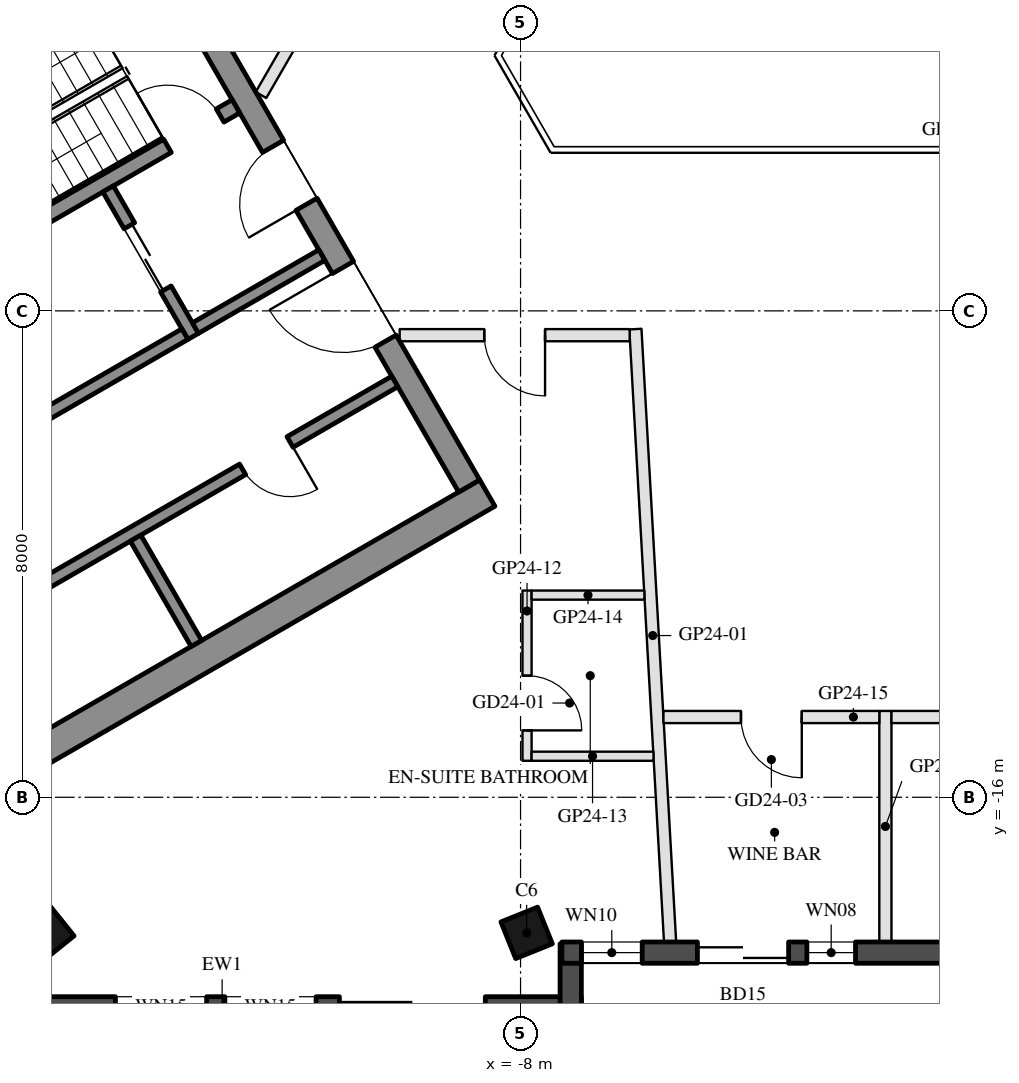
"""IFC4 building model, lengths in metres.
Left out: names, types, materials, properties, quantities, classifications, styles, units other than length and angle.
Written with IfcOpenShell. Run it as: python <this file> out.ifc"""

import sys

from ifc_helpers import new_model, si_unit, direction, frame, frame_2d, origin, origin_2d, place, context, subcontext, project, spatial, rectangle, hollow_rectangle, extrude, boolean, halfspace, element, fill, save


model = new_model("IFC4")
c1 = context("Model", 3, precision=1e-05, world=origin(), true_north=direction((0.0, 1.0)))
c2 = subcontext(c1, "Body", "Model", "MODEL_VIEW")
j1 = project(units=[si_unit("LENGTHUNIT", "METRE"), si_unit("PLANEANGLEUNIT", "RADIAN")], contexts=[c1])
p1 = place(None, origin())
s1 = spatial("IfcSite", under=j1, at=p1, CompositionType="ELEMENT")
p2 = place(p1, origin())
s2 = spatial("IfcBuilding", under=s1, at=p2, CompositionType="ELEMENT")
p3 = place(p2, frame((0.0, 0.0, 254.1)))
s3 = spatial("IfcBuildingStorey", under=s2, at=p3, CompositionType="ELEMENT", Elevation=254.1)
p4 = place(p3, frame((-15.8, -18.23, 0.0), z_axis=(0.121069901949, 0.150398600122, 0.981184151892), x_axis=(-0.992602524484, 0.009308864005, 0.121051945213)))
e1 = element("IfcColumn", 1, at=p4, inside=s3, PredefinedType="COLUMN", context=c2, shape_type="SweptSolid", body=[
    boolean("DIFFERENCE", boolean("DIFFERENCE", extrude(hollow_rectangle(XDim=0.65, YDim=0.65, WallThickness=0.03, at=origin_2d()), origin(), (0.0, 0.0, 1.0), 3.771), halfspace(frame((0.0, 0.0, 0.047), z_axis=(0.0, 0.0, 1.0), x_axis=(1.0, 0.0, 0.0)), True)), halfspace(frame((0.0, 0.0, 3.724), z_axis=(0.0, 0.0, 1.0), x_axis=(1.0, 0.0, 0.0)), False)),
])
p5 = place(p3, frame((-7.9, -18.23, 0.0), z_axis=(0.060805602285, 0.151232777417, 0.986626234075), x_axis=(-0.998137511125, 0.004342411053, 0.060849423591)))
e2 = element("IfcColumn", 2, at=p5, inside=s3, PredefinedType="COLUMN", context=c2, shape_type="SweptSolid", body=[
    boolean("DIFFERENCE", boolean("DIFFERENCE", extrude(hollow_rectangle(XDim=0.65, YDim=0.65, WallThickness=0.03, at=origin_2d()), origin(), (0.0, 0.0, 1.0), 3.75), halfspace(frame((0.0, 0.0, 0.04), z_axis=(0.0, 0.0, 1.0), x_axis=(1.0, 0.0, 0.0)), True)), halfspace(frame((0.0, 0.0, 3.71), z_axis=(0.0, 0.0, 1.0), x_axis=(1.0, 0.0, 0.0)), False)),
])
p6 = place(p3, frame((-18.816, -19.455, 0.0), z_axis=(0.0, 0.0, 1.0), x_axis=(1.0, 0.0, 0.0)))
e3 = element("IfcWall", 3, at=p6, inside=s3, PredefinedType="SOLIDWALL", context=c2, shape_type="SweptSolid", body=[
    extrude(rectangle(XDim=11.816, YDim=0.35, at=frame_2d((5.908, 0.0))), origin(), (0.0, 0.0, 1.0), 3.55),
])
p7 = place(p6, frame((0.381, 0.0, 0.3)))
e4 = element("IfcOpeningElement", 4, at=p7, cuts=e3, PredefinedType="OPENING", context=c2, shape_type="SweptSolid", body=[
    extrude(rectangle(XDim=1.9, YDim=2.65, at=frame_2d((0.95, 1.325))), frame((0.0, 0.185, 0.0), z_axis=(0.0, -1.0, 0.0), x_axis=(1.0, 0.0, 0.0)), (0.0, 0.0, 1.0), 0.37),
])
p8 = place(p6, frame((7.836, 0.0, 0.0)))
e5 = element("IfcOpeningElement", 5, at=p8, cuts=e3, PredefinedType="OPENING", context=c2, shape_type="SweptSolid", body=[
    extrude(rectangle(XDim=2.4, YDim=2.4, at=frame_2d((1.2, 1.2))), frame((0.0, 0.185, 0.0), z_axis=(0.0, -1.0, 0.0), x_axis=(1.0, 0.0, 0.0)), (0.0, 0.0, 1.0), 0.37),
])
p9 = place(p6, frame((4.153, 0.0, 0.3)))
e6 = element("IfcOpeningElement", 6, at=p9, cuts=e3, PredefinedType="OPENING", context=c2, shape_type="SweptSolid", body=[
    extrude(rectangle(XDim=1.5, YDim=2.65, at=frame_2d((0.75, 1.325))), frame((0.0, 0.185, 0.0), z_axis=(0.0, -1.0, 0.0), x_axis=(1.0, 0.0, 0.0)), (0.0, 0.0, 1.0), 0.37),
])
p10 = place(p6, frame((5.953, 0.0, 0.3)))
e7 = element("IfcOpeningElement", 7, at=p10, cuts=e3, PredefinedType="OPENING", context=c2, shape_type="SweptSolid", body=[
    extrude(rectangle(XDim=1.5, YDim=2.65, at=frame_2d((0.75, 1.325))), frame((0.0, 0.185, 0.0), z_axis=(0.0, -1.0, 0.0), x_axis=(1.0, 0.0, 0.0)), (0.0, 0.0, 1.0), 0.37),
])
p11 = place(p3, frame((-7.175, -19.63, 0.0), z_axis=(0.0, 0.0, 1.0), x_axis=(0.0, 1.0, 0.0)))
e8 = element("IfcWall", 8, at=p11, inside=s3, PredefinedType="SOLIDWALL", context=c2, shape_type="SweptSolid", body=[
    extrude(rectangle(XDim=1.22, YDim=0.35, at=frame_2d((0.61, 0.0))), origin(), (0.0, 0.0, 1.0), 3.55),
])
p12 = place(p3, frame((-7.32, -18.555, 0.0), z_axis=(0.0, 0.0, 1.0), x_axis=(1.0, 0.0, 0.0)))
e9 = element("IfcWall", 9, at=p12, inside=s3, PredefinedType="SOLIDWALL", context=c2, shape_type="SweptSolid", body=[
    extrude(rectangle(XDim=6.74, YDim=0.35, at=frame_2d((3.37, 0.0))), origin(), (0.0, 0.0, 1.0), 3.55),
])
p13 = place(p12, frame((0.32, 0.0, 0.3)))
e10 = element("IfcOpeningElement", 10, at=p13, cuts=e9, PredefinedType="OPENING", context=c2, shape_type="SweptSolid", body=[
    extrude(rectangle(XDim=1.0, YDim=2.65, at=frame_2d((0.5, 1.325))), frame((0.0, 0.185, 0.0), z_axis=(0.0, -1.0, 0.0), x_axis=(1.0, 0.0, 0.0)), (0.0, 0.0, 1.0), 0.37),
])
p14 = place(p12, frame((2.229, 0.0, 0.0)))
e11 = element("IfcOpeningElement", 11, at=p14, cuts=e9, PredefinedType="OPENING", context=c2, shape_type="SweptSolid", body=[
    extrude(rectangle(XDim=1.5, YDim=2.4, at=frame_2d((0.75, 1.2))), frame((0.0, 0.185, 0.0), z_axis=(0.0, -1.0, 0.0), x_axis=(1.0, 0.0, 0.0)), (0.0, 0.0, 1.0), 0.37),
])
p15 = place(p12, frame((4.029, 0.0, 0.3)))
e12 = element("IfcOpeningElement", 12, at=p15, cuts=e9, PredefinedType="OPENING", context=c2, shape_type="SweptSolid", body=[
    extrude(rectangle(XDim=0.8, YDim=2.65, at=frame_2d((0.4, 1.325))), frame((0.0, 0.185, 0.0), z_axis=(0.0, -1.0, 0.0), x_axis=(1.0, 0.0, 0.0)), (0.0, 0.0, 1.0), 0.37),
])
for number, where, z_axis, x_axis in (
    (13, (-13.797, -1.903, 0.0), (0.0, 0.0, 1.0), (-0.866, -0.5, 0.0)),
    (14, (-8.547, -10.997, 0.0), (0.0, 0.0, 1.0), (-0.866, -0.5, 0.0)),
):
    element("IfcWall", number, at=place(p3, frame(where, z_axis=z_axis, x_axis=x_axis)), inside=s3, PredefinedType="SHEAR", context=c2, shape_type="SweptSolid", body=[
        extrude(rectangle(XDim=14.837, YDim=0.5, at=frame_2d((7.418, 0.0))), origin(), (0.0, 0.0, 1.0), 3.5),
    ])
p16 = place(p3, frame((-13.845, -2.22, 0.0), z_axis=(0.0, 0.0, 1.0), x_axis=(0.500004234368, -0.866022959057, 0.0)))
e15 = element("IfcWall", 15, at=p16, inside=s3, PredefinedType="SHEAR", context=c2, shape_type="SweptSolid", body=[
    extrude(rectangle(XDim=10.0, YDim=0.4, at=frame_2d((5.0, 0.0))), origin(), (0.0, 0.0, 1.0), 3.5),
])
p17 = place(p16, frame((3.55, 0.0, 0.0)))
e16 = element("IfcOpeningElement", 16, at=p17, cuts=e15, PredefinedType="OPENING", context=c2, shape_type="SweptSolid", body=[
    extrude(rectangle(XDim=1.1, YDim=2.1, at=frame_2d((0.55, 1.05))), frame((0.0, 0.21, 0.0), z_axis=(0.0, -1.0, 0.0), x_axis=(1.0, 0.0, 0.0)), (0.0, 0.0, 1.0), 0.42),
])
p18 = place(p16, frame((5.85, 0.0, 0.0)))
e17 = element("IfcOpeningElement", 17, at=p18, cuts=e15, PredefinedType="OPENING", context=c2, shape_type="SweptSolid", body=[
    extrude(rectangle(XDim=1.4, YDim=2.1, at=frame_2d((0.7, 1.05))), frame((0.0, 0.21, 0.0), z_axis=(0.0, -1.0, 0.0), x_axis=(1.0, 0.0, 0.0)), (0.0, 0.0, 1.0), 0.42),
])
p19 = place(p3, frame((-12.681, -4.636, 0.0), z_axis=(0.0, 0.0, 1.0), x_axis=(-0.866021702275, -0.500006411147, 0.0)))
e18 = element("IfcWall", 18, at=p19, inside=s3, PredefinedType="SHEAR", context=c2, shape_type="SweptSolid", body=[
    extrude(rectangle(XDim=6.45, YDim=0.25, at=frame_2d((3.225, 0.0))), origin(), (0.0, 0.0, 1.0), 3.5),
])
p20 = place(p19, frame((0.3, 0.0, 0.0)))
e19 = element("IfcOpeningElement", 19, at=p20, cuts=e18, PredefinedType="OPENING", context=c2, shape_type="SweptSolid", body=[
    extrude(rectangle(XDim=1.0, YDim=2.1, at=frame_2d((0.5, 1.05))), frame((0.0, 0.135, 0.0), z_axis=(0.0, -1.0, 0.0), x_axis=(1.0, 0.0, 0.0)), (0.0, 0.0, 1.0), 0.27),
])
p21 = place(p3, frame((-14.783, -5.995, 0.0), z_axis=(0.0, 0.0, 1.0), x_axis=(0.49994636267, -0.866056369097, 0.0)))
e20 = element("IfcWall", 20, at=p21, inside=s3, PredefinedType="SHEAR", context=c2, shape_type="SweptSolid", body=[
    extrude(rectangle(XDim=2.8, YDim=0.2, at=frame_2d((1.4, 0.0))), origin(), (0.0, 0.0, 1.0), 3.5),
])
p22 = place(p21, frame((0.7, 0.0, 0.0)))
e21 = element("IfcOpeningElement", 21, at=p22, cuts=e20, PredefinedType="OPENING", context=c2, shape_type="SweptSolid", body=[
    extrude(rectangle(XDim=1.2, YDim=2.1, at=frame_2d((0.6, 1.05))), frame((0.0, 0.11, 0.0), z_axis=(0.0, -1.0, 0.0), x_axis=(1.0, 0.0, 0.0)), (0.0, 0.0, 1.0), 0.22),
])
p23 = place(p3, frame((-13.52, -8.383, 0.0), z_axis=(0.0, 0.0, 1.0), x_axis=(-0.866034573852, -0.49998411664, 0.0)))
e22 = element("IfcWall", 22, at=p23, inside=s3, PredefinedType="SHEAR", context=c2, shape_type="SweptSolid", body=[
    extrude(rectangle(XDim=2.8, YDim=0.2, at=frame_2d((1.4, 0.0))), origin(), (0.0, 0.0, 1.0), 3.5),
])
p24 = place(p3, frame((-11.268, -7.083, 0.0), z_axis=(0.0, 0.0, 1.0), x_axis=(-0.866050077142, -0.499957262057, 0.0)))
e23 = element("IfcWall", 23, at=p24, inside=s3, PredefinedType="SHEAR", context=c2, shape_type="SweptSolid", body=[
    extrude(rectangle(XDim=2.4, YDim=0.2, at=frame_2d((1.2, 0.0))), origin(), (0.0, 0.0, 1.0), 3.5),
])
p25 = place(p3, frame((-10.068, -9.162, 0.0), z_axis=(0.0, 0.0, 1.0), x_axis=(-0.866032725843, -0.499987317609, 0.0)))
e24 = element("IfcWall", 24, at=p25, inside=s3, PredefinedType="SHEAR", context=c2, shape_type="SweptSolid", body=[
    extrude(rectangle(XDim=10.16, YDim=0.2, at=frame_2d((5.08, 0.0))), origin(), (0.0, 0.0, 1.0), 3.5),
])
p26 = place(p25, frame((1.99, 0.0, 0.0)))
e25 = element("IfcOpeningElement", 25, at=p26, cuts=e24, PredefinedType="OPENING", context=c2, shape_type="SweptSolid", body=[
    extrude(rectangle(XDim=0.9, YDim=2.1, at=frame_2d((0.45, 1.05))), frame((0.0, 0.11, 0.0), z_axis=(0.0, -1.0, 0.0), x_axis=(1.0, 0.0, 0.0)), (0.0, 0.0, 1.0), 0.22),
])
p27 = place(p25, frame((7.07, 0.0, 0.0)))
e26 = element("IfcOpeningElement", 26, at=p27, cuts=e24, PredefinedType="OPENING", context=c2, shape_type="SweptSolid", body=[
    extrude(rectangle(XDim=0.9, YDim=2.1, at=frame_2d((0.45, 1.05))), frame((0.0, 0.11, 0.0), z_axis=(0.0, -1.0, 0.0), x_axis=(1.0, 0.0, 0.0)), (0.0, 0.0, 1.0), 0.22),
])
p28 = place(p3, frame((-14.331, -11.738, 0.0), z_axis=(0.0, 0.0, 1.0), x_axis=(0.499972520799, -0.866041268327, 0.0)))
e27 = element("IfcWall", 27, at=p28, inside=s3, PredefinedType="SHEAR", context=c2, shape_type="SweptSolid", body=[
    extrude(rectangle(XDim=2.0, YDim=0.2, at=frame_2d((1.0, 0.0))), origin(), (0.0, 0.0, 1.0), 3.5),
])
p29 = place(p3, frame((-5.541, -18.38, 0.0), z_axis=(0.0, 0.0, 1.0), x_axis=(-0.056489207214, 0.998403209865, 0.0)))
e28 = element("IfcWall", 28, at=p29, inside=s3, PredefinedType="PARTITIONING", context=c2, shape_type="SweptSolid", body=[
    extrude(rectangle(XDim=10.096, YDim=0.2, at=frame_2d((5.048, 0.0))), origin(), (0.0, 0.0, 1.0), 3.1),
])
p30 = place(p3, frame((-2.0, -18.38, 0.0), z_axis=(0.0, 0.0, 1.0), x_axis=(0.0, 1.0, 0.0)))
e29 = element("IfcWall", 29, at=p30, inside=s3, PredefinedType="PARTITIONING", context=c2, shape_type="SweptSolid", body=[
    extrude(rectangle(XDim=3.8, YDim=0.2, at=frame_2d((1.9, 0.0))), origin(), (0.0, 0.0, 1.0), 3.1),
])
p31 = place(p3, frame((-6.206, -8.4, 0.0), z_axis=(0.0, 0.0, 1.0), x_axis=(-1.0, 0.0, 0.0)))
e30 = element("IfcWall", 30, at=p31, inside=s3, PredefinedType="PARTITIONING", context=c2, shape_type="SweptSolid", body=[
    extrude(rectangle(XDim=3.782, YDim=0.2, at=frame_2d((1.891, 0.0))), origin(), (0.0, 0.0, 1.0), 3.0),
])
p32 = place(p31, frame((1.391, 0.0, 0.0)))
e31 = element("IfcOpeningElement", 31, at=p32, cuts=e30, PredefinedType="OPENING", context=c2, shape_type="SweptSolid", body=[
    extrude(rectangle(XDim=1.0, YDim=2.1, at=frame_2d((0.5, 1.05))), frame((0.0, 0.11, 0.0), z_axis=(0.0, -1.0, 0.0), x_axis=(1.0, 0.0, 0.0)), (0.0, 0.0, 1.0), 0.22),
])
p33 = place(p3, frame((-7.893, -12.6, 0.0), z_axis=(0.0, 0.0, 1.0), x_axis=(0.0, -1.0, 0.0)))
e32 = element("IfcWall", 32, at=p33, inside=s3, PredefinedType="PARTITIONING", context=c2, shape_type="SweptSolid", body=[
    extrude(rectangle(XDim=2.8, YDim=0.15, at=frame_2d((1.4, 0.0))), origin(), (0.0, 0.0, 1.0), 3.55),
])
p34 = place(p33, frame((1.4, 0.0, 0.0)))
e33 = element("IfcOpeningElement", 33, at=p34, cuts=e32, PredefinedType="OPENING", context=c2, shape_type="SweptSolid", body=[
    extrude(rectangle(XDim=0.9, YDim=2.1, at=frame_2d((0.45, 1.05))), frame((0.0, 0.085, 0.0), z_axis=(0.0, -1.0, 0.0), x_axis=(1.0, 0.0, 0.0)), (0.0, 0.0, 1.0), 0.17),
])
p35 = place(p3, frame((-7.818, -15.325, 0.0), z_axis=(0.0, 0.0, 1.0), x_axis=(1.0, 0.0, 0.0)))
e34 = element("IfcWall", 34, at=p35, inside=s3, PredefinedType="PARTITIONING", context=c2, shape_type="SweptSolid", body=[
    extrude(rectangle(XDim=2.004, YDim=0.15, at=frame_2d((1.002, 0.0))), origin(), (0.0, 0.0, 1.0), 3.0),
])
p36 = place(p3, frame((-7.818, -12.675, 0.0), z_axis=(0.0, 0.0, 1.0), x_axis=(1.0, 0.0, 0.0)))
e35 = element("IfcWall", 35, at=p36, inside=s3, PredefinedType="PARTITIONING", context=c2, shape_type="SweptSolid", body=[
    extrude(rectangle(XDim=1.854, YDim=0.15, at=frame_2d((0.927, 0.0))), origin(), (0.0, 0.0, 1.0), 3.0),
])
p37 = place(p3, frame((-2.1, -14.68, 0.0), z_axis=(0.0, 0.0, 1.0), x_axis=(-1.0, 0.0, 0.0)))
e36 = element("IfcWall", 36, at=p37, inside=s3, PredefinedType="PARTITIONING", context=c2, shape_type="SweptSolid", body=[
    extrude(rectangle(XDim=3.55, YDim=0.2, at=frame_2d((1.775, 0.0))), origin(), (0.0, 0.0, 1.0), 3.0),
])
p38 = place(p37, frame((1.275, 0.0, 0.0)))
e37 = element("IfcOpeningElement", 37, at=p38, cuts=e36, PredefinedType="OPENING", context=c2, shape_type="SweptSolid", body=[
    extrude(rectangle(XDim=1.0, YDim=2.1, at=frame_2d((0.5, 1.05))), frame((0.0, 0.11, 0.0), z_axis=(0.0, -1.0, 0.0), x_axis=(1.0, 0.0, 0.0)), (0.0, 0.0, 1.0), 0.22),
])
p39 = place(p3, frame((2.244, -14.68, 0.0), z_axis=(0.0, 0.0, 1.0), x_axis=(-1.0, 0.0, 0.0)))
e38 = element("IfcWall", 38, at=p39, inside=s3, PredefinedType="PARTITIONING", context=c2, shape_type="SweptSolid", body=[
    extrude(rectangle(XDim=4.144, YDim=0.2, at=frame_2d((2.072, 0.0))), origin(), (0.0, 0.0, 1.0), 3.0),
])
p40 = place(p39, frame((1.572, 0.0, 0.0)))
e39 = element("IfcOpeningElement", 39, at=p40, cuts=e38, PredefinedType="OPENING", context=c2, shape_type="SweptSolid", body=[
    extrude(rectangle(XDim=1.0, YDim=2.1, at=frame_2d((0.5, 1.05))), frame((0.0, 0.11, 0.0), z_axis=(0.0, -1.0, 0.0), x_axis=(1.0, 0.0, 0.0)), (0.0, 0.0, 1.0), 0.22),
])
p41 = place(p3, frame((-12.269, -4.45, 0.0), z_axis=(0.0, 0.0, 1.0), x_axis=(0.500004836318, 0.866022611517, 0.0)))
e40 = element("IfcWall", 40, at=p41, inside=s3, PredefinedType="PARTITIONING", context=c2, shape_type="SweptSolid", body=[
    extrude(rectangle(XDim=5.488, YDim=0.2, at=frame_2d((2.744, 0.0))), origin(), (0.0, 0.0, 1.0), 3.0),
])
p42 = place(p41, frame((2.244, 0.0, 0.0)))
e41 = element("IfcOpeningElement", 41, at=p42, cuts=e40, PredefinedType="OPENING", context=c2, shape_type="SweptSolid", body=[
    extrude(rectangle(XDim=1.0, YDim=2.1, at=frame_2d((0.5, 1.05))), frame((0.0, 0.11, 0.0), z_axis=(0.0, -1.0, 0.0), x_axis=(1.0, 0.0, 0.0)), (0.0, 0.0, 1.0), 0.22),
])
p43 = place(p13, origin())
e42 = element("IfcWindow", 42, at=p43, inside=s3, PartitioningType="SINGLE_PANEL", PredefinedType="WINDOW", context=c2, shape_type="SweptSolid", body=[
    extrude(rectangle(XDim=1.0, YDim=2.65, at=frame_2d((0.5, 1.325))), frame((0.0, 0.03, 0.0), z_axis=(0.0, -1.0, 0.0), x_axis=(1.0, 0.0, 0.0)), (0.0, 0.0, 1.0), 0.06),
])
fill(e10, e42)
p44 = place(p14, frame((1.5, 0.0, 0.0), z_axis=(0.0, 0.0, 1.0), x_axis=(-1.0, 0.0, 0.0)))
e43 = element("IfcDoor", 43, at=p44, inside=s3, OperationType="SLIDING_TO_LEFT", PredefinedType="DOOR", context=c2, shape_type="SweptSolid", body=[
    extrude(rectangle(XDim=1.5, YDim=2.4, at=frame_2d((0.75, 1.2))), frame((0.0, 0.025, 0.0), z_axis=(0.0, -1.0, 0.0), x_axis=(1.0, 0.0, 0.0)), (0.0, 0.0, 1.0), 0.05),
])
fill(e11, e43)
p45 = place(p15, origin())
e44 = element("IfcWindow", 44, at=p45, inside=s3, PartitioningType="SINGLE_PANEL", PredefinedType="WINDOW", context=c2, shape_type="SweptSolid", body=[
    extrude(rectangle(XDim=0.8, YDim=2.65, at=frame_2d((0.4, 1.325))), frame((0.0, 0.03, 0.0), z_axis=(0.0, -1.0, 0.0), x_axis=(1.0, 0.0, 0.0)), (0.0, 0.0, 1.0), 0.06),
])
fill(e12, e44)
p46 = place(p22, origin())
e45 = element("IfcDoor", 45, at=p46, inside=s3, OperationType="DOUBLE_DOOR_SLIDING", PredefinedType="DOOR", context=c2, shape_type="SweptSolid", body=[
    extrude(rectangle(XDim=1.2, YDim=2.1, at=frame_2d((0.6, 1.05))), frame((0.0, 0.025, 0.0), z_axis=(0.0, -1.0, 0.0), x_axis=(1.0, 0.0, 0.0)), (0.0, 0.0, 1.0), 0.05),
])
fill(e21, e45)
p47 = place(p26, origin())
e46 = element("IfcDoor", 46, at=p47, inside=s3, OperationType="SINGLE_SWING_LEFT", PredefinedType="DOOR", context=c2, shape_type="SweptSolid", body=[
    extrude(rectangle(XDim=0.9, YDim=2.1, at=frame_2d((0.45, 1.05))), frame((0.0, 0.025, 0.0), z_axis=(0.0, -1.0, 0.0), x_axis=(1.0, 0.0, 0.0)), (0.0, 0.0, 1.0), 0.05),
])
fill(e25, e46)
p48 = place(p17, frame((1.1, 0.0, 0.0), z_axis=(0.0, 0.0, 1.0), x_axis=(-1.0, 0.0, 0.0)))
e47 = element("IfcDoor", 47, at=p48, inside=s3, OperationType="SINGLE_SWING_LEFT", PredefinedType="DOOR", context=c2, shape_type="SweptSolid", body=[
    extrude(rectangle(XDim=1.1, YDim=2.1, at=frame_2d((0.55, 1.05))), frame((0.0, 0.025, 0.0), z_axis=(0.0, -1.0, 0.0), x_axis=(1.0, 0.0, 0.0)), (0.0, 0.0, 1.0), 0.05),
])
fill(e16, e47)
p49 = place(p18, frame((1.4, 0.0, 0.0), z_axis=(0.0, 0.0, 1.0), x_axis=(-1.0, 0.0, 0.0)))
e48 = element("IfcDoor", 48, at=p49, inside=s3, OperationType="DOUBLE_DOOR_SINGLE_SWING", PredefinedType="DOOR", context=c2, shape_type="SweptSolid", body=[
    extrude(rectangle(XDim=1.4, YDim=2.1, at=frame_2d((0.7, 1.05))), frame((0.0, 0.025, 0.0), z_axis=(0.0, -1.0, 0.0), x_axis=(1.0, 0.0, 0.0)), (0.0, 0.0, 1.0), 0.05),
])
fill(e17, e48)
p50 = place(p20, frame((1.0, 0.0, 0.0), z_axis=(0.0, 0.0, 1.0), x_axis=(-1.0, 0.0, 0.0)))
e49 = element("IfcDoor", 49, at=p50, inside=s3, OperationType="SINGLE_SWING_LEFT", PredefinedType="DOOR", context=c2, shape_type="SweptSolid", body=[
    extrude(rectangle(XDim=1.0, YDim=2.1, at=frame_2d((0.5, 1.05))), frame((0.0, 0.025, 0.0), z_axis=(0.0, -1.0, 0.0), x_axis=(1.0, 0.0, 0.0)), (0.0, 0.0, 1.0), 0.05),
])
fill(e19, e49)
p51 = place(p34, origin())
e50 = element("IfcDoor", 50, at=p51, inside=s3, OperationType="SINGLE_SWING_RIGHT", PredefinedType="DOOR", context=c2, shape_type="SweptSolid", body=[
    extrude(rectangle(XDim=0.9, YDim=2.1, at=frame_2d((0.45, 1.05))), frame((0.0, 0.025, 0.0), z_axis=(0.0, -1.0, 0.0), x_axis=(1.0, 0.0, 0.0)), (0.0, 0.0, 1.0), 0.05),
])
fill(e33, e50)
p52 = place(p32, origin())
e51 = element("IfcDoor", 51, at=p52, inside=s3, OperationType="SINGLE_SWING_LEFT", PredefinedType="DOOR", context=c2, shape_type="SweptSolid", body=[
    extrude(rectangle(XDim=1.0, YDim=2.1, at=frame_2d((0.5, 1.05))), frame((0.0, 0.025, 0.0), z_axis=(0.0, -1.0, 0.0), x_axis=(1.0, 0.0, 0.0)), (0.0, 0.0, 1.0), 0.05),
])
fill(e31, e51)
p53 = place(p38, origin())
e52 = element("IfcDoor", 52, at=p53, inside=s3, OperationType="SINGLE_SWING_LEFT", PredefinedType="DOOR", context=c2, shape_type="SweptSolid", body=[
    extrude(rectangle(XDim=1.0, YDim=2.1, at=frame_2d((0.5, 1.05))), frame((0.0, 0.025, 0.0), z_axis=(0.0, -1.0, 0.0), x_axis=(1.0, 0.0, 0.0)), (0.0, 0.0, 1.0), 0.05),
])
fill(e37, e52)
save(model, sys.argv[1])
